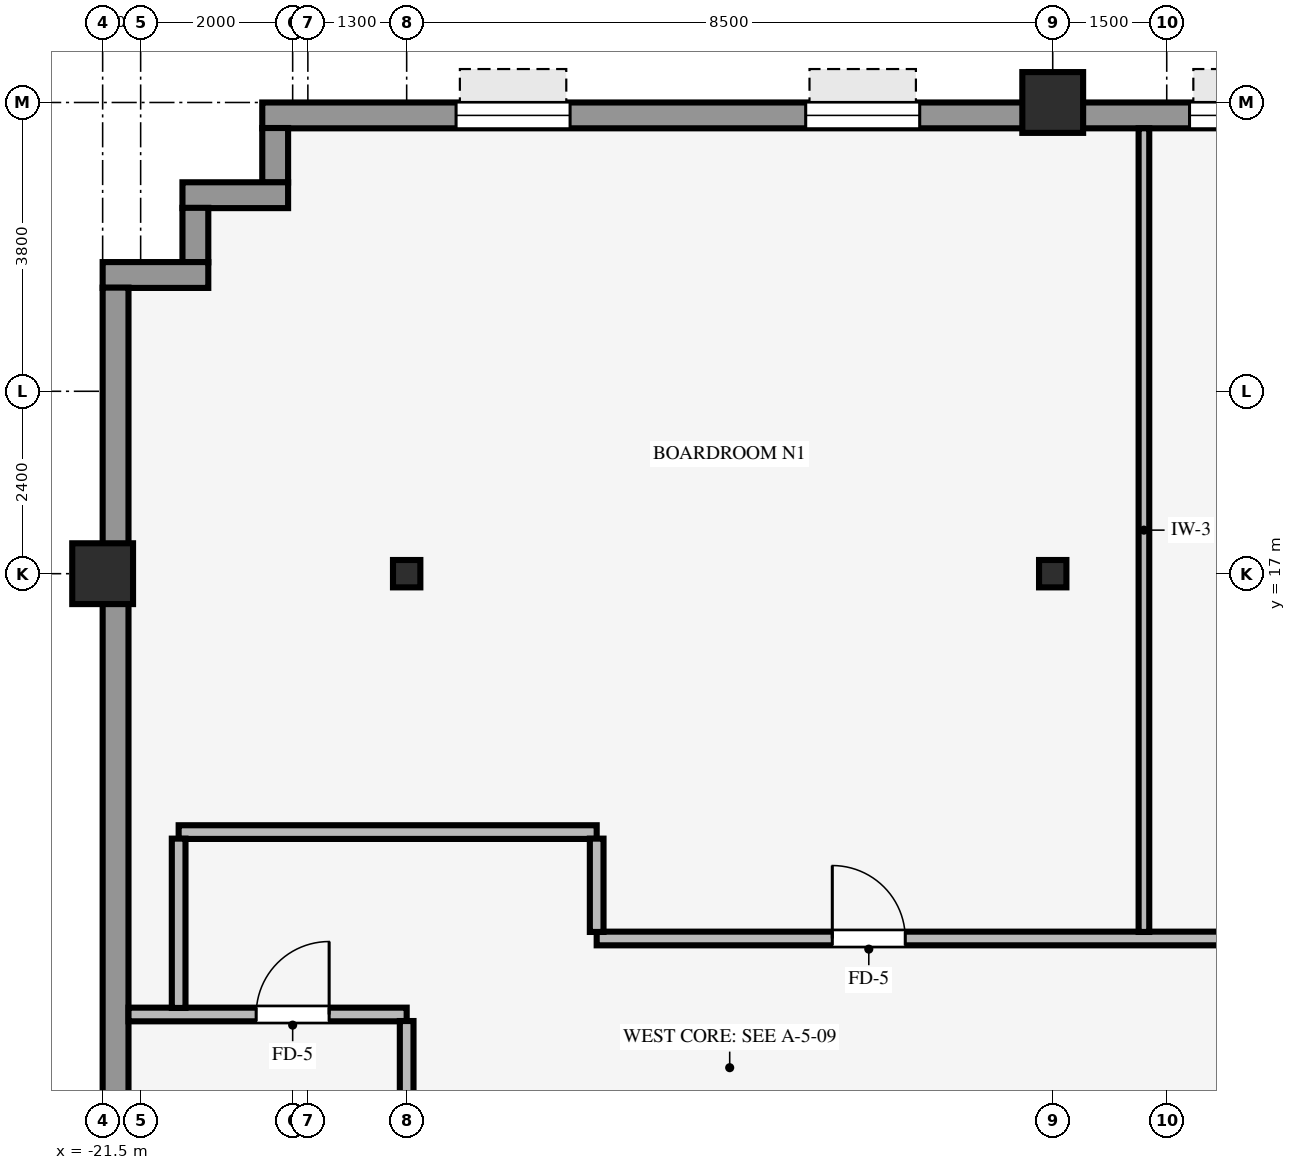
"""IFC4 building model, lengths in metres.
Left out: names, types, materials, properties, quantities, classifications, styles, units other than length and angle.
Written with IfcOpenShell. Run it as: python <this file> out.ifc"""

import sys

from ifc_helpers import new_model, si_unit, direction, frame, frame_2d, origin, origin_2d, place, context, subcontext, project, spatial, rectangle, hollow_rectangle, i_section, extrude, source, transform, mapped, element, fill, save


model = new_model("IFC4")
c1 = context("Model", 3, precision=1e-05, world=origin(), true_north=direction((0.0, 1.0)))
c2 = subcontext(c1, "Body", "Model", "MODEL_VIEW")
j1 = project(units=[si_unit("LENGTHUNIT", "METRE"), si_unit("PLANEANGLEUNIT", "RADIAN")], contexts=[c1])
p1 = place(None, origin())
s1 = spatial("IfcSite", under=j1, at=p1, CompositionType="ELEMENT")
p2 = place(p1, origin())
s2 = spatial("IfcBuilding", under=s1, at=p2, CompositionType="ELEMENT")
p3 = place(p2, frame((0.0, 0.0, 82.35)))
s3 = spatial("IfcBuildingStorey", under=s2, at=p3, CompositionType="ELEMENT", Elevation=82.35)
for number, where, z_axis, x_axis in (
    (1, (-21.5, 17.0, 0.0), (0.0, 0.0, 1.0), (1.0, 0.0, 0.0)),
    (2, (-9.0, 23.2, 0.0), (0.0, 0.0, 1.0), (1.0, 0.0, 0.0)),
):
    element("IfcColumn", number, at=place(p3, frame(where, z_axis=z_axis, x_axis=x_axis)), inside=s3, PredefinedType="COLUMN", context=c2, shape_type="SweptSolid", body=[
        extrude(hollow_rectangle(XDim=0.8, YDim=0.8, WallThickness=0.055, InnerFilletRadius=0.055, OuterFilletRadius=0.11, at=origin_2d()), origin(), (0.0, 0.0, 1.0), 3.25),
    ])
for number, where, z_axis, x_axis in (
    (3, (-17.5, 17.0, 0.0), (0.0, 0.0, 1.0), (1.0, 0.0, 0.0)),
    (4, (-9.0, 17.0, 0.0), (0.0, 0.0, 1.0), (1.0, 0.0, 0.0)),
):
    element("IfcColumn", number, at=place(p3, frame(where, z_axis=z_axis, x_axis=x_axis)), inside=s3, PredefinedType="COLUMN", context=c2, shape_type="SweptSolid", body=[
        extrude(i_section(OverallWidth=0.36, OverallDepth=0.36, WebThickness=0.021, FlangeThickness=0.021, FilletRadius=0.018, at=origin_2d()), origin(), (0.0, 0.0, 1.0), 3.25),
    ])
p4 = place(p3, frame((-19.4, 23.03, 0.0), z_axis=(0.0, 0.0, 1.0), x_axis=(1.0, 0.0, 0.0)))
e5 = element("IfcWall", 5, at=p4, inside=s3, PredefinedType="STANDARD", context=c2, shape_type="SweptSolid", body=[
    extrude(rectangle(XDim=38.8, YDim=0.34, at=frame_2d((19.4, 0.0))), origin(), (0.0, 0.0, 1.0), 2.585),
])
p5 = place(p4, frame((2.55, 0.0, 0.8)))
e6 = element("IfcOpeningElement", 6, at=p5, cuts=e5, PredefinedType="OPENING", context=c2, shape_type="SweptSolid", body=[
    extrude(rectangle(XDim=1.5, YDim=1.6, at=frame_2d((0.75, 0.8))), frame((0.0, 0.18, 0.0), z_axis=(0.0, -1.0, 0.0), x_axis=(1.0, 0.0, 0.0)), (0.0, 0.0, 1.0), 0.36),
])
p6 = place(p4, frame((7.15, 0.0, 0.8)))
e7 = element("IfcOpeningElement", 7, at=p6, cuts=e5, PredefinedType="OPENING", context=c2, shape_type="SweptSolid", body=[
    extrude(rectangle(XDim=1.5, YDim=1.6, at=frame_2d((0.75, 0.8))), frame((0.0, 0.18, 0.0), z_axis=(0.0, -1.0, 0.0), x_axis=(1.0, 0.0, 0.0)), (0.0, 0.0, 1.0), 0.36),
])
p7 = place(p4, frame((12.2, 0.0, 0.8)))
e8 = element("IfcOpeningElement", 8, at=p7, cuts=e5, PredefinedType="OPENING", context=c2, shape_type="SweptSolid", body=[
    extrude(rectangle(XDim=1.5, YDim=1.6, at=frame_2d((0.75, 0.8))), frame((0.0, 0.18, 0.0), z_axis=(0.0, -1.0, 0.0), x_axis=(1.0, 0.0, 0.0)), (0.0, 0.0, 1.0), 0.36),
])
p8 = place(p4, frame((16.35, 0.0, 0.8)))
e9 = element("IfcOpeningElement", 9, at=p8, cuts=e5, PredefinedType="OPENING", context=c2, shape_type="SweptSolid", body=[
    extrude(rectangle(XDim=1.5, YDim=1.6, at=frame_2d((0.75, 0.8))), frame((0.0, 0.18, 0.0), z_axis=(0.0, -1.0, 0.0), x_axis=(1.0, 0.0, 0.0)), (0.0, 0.0, 1.0), 0.36),
])
p9 = place(p4, frame((20.95, 0.0, 0.8)))
e10 = element("IfcOpeningElement", 10, at=p9, cuts=e5, PredefinedType="OPENING", context=c2, shape_type="SweptSolid", body=[
    extrude(rectangle(XDim=1.5, YDim=1.6, at=frame_2d((0.75, 0.8))), frame((0.0, 0.18, 0.0), z_axis=(0.0, -1.0, 0.0), x_axis=(1.0, 0.0, 0.0)), (0.0, 0.0, 1.0), 0.36),
])
p10 = place(p4, frame((25.55, 0.0, 0.8)))
e11 = element("IfcOpeningElement", 11, at=p10, cuts=e5, PredefinedType="OPENING", context=c2, shape_type="SweptSolid", body=[
    extrude(rectangle(XDim=1.5, YDim=1.6, at=frame_2d((0.75, 0.8))), frame((0.0, 0.18, 0.0), z_axis=(0.0, -1.0, 0.0), x_axis=(1.0, 0.0, 0.0)), (0.0, 0.0, 1.0), 0.36),
])
p11 = place(p4, frame((30.15, 0.0, 0.8)))
e12 = element("IfcOpeningElement", 12, at=p11, cuts=e5, PredefinedType="OPENING", context=c2, shape_type="SweptSolid", body=[
    extrude(rectangle(XDim=1.5, YDim=1.6, at=frame_2d((0.75, 0.8))), frame((0.0, 0.18, 0.0), z_axis=(0.0, -1.0, 0.0), x_axis=(1.0, 0.0, 0.0)), (0.0, 0.0, 1.0), 0.36),
])
p12 = place(p4, frame((34.75, 0.0, 0.8)))
e13 = element("IfcOpeningElement", 13, at=p12, cuts=e5, PredefinedType="OPENING", context=c2, shape_type="SweptSolid", body=[
    extrude(rectangle(XDim=1.5, YDim=1.6, at=frame_2d((0.75, 0.8))), frame((0.0, 0.18, 0.0), z_axis=(0.0, -1.0, 0.0), x_axis=(1.0, 0.0, 0.0)), (0.0, 0.0, 1.0), 0.36),
])
p13 = place(p3, frame((-19.23, 22.146, 0.0), z_axis=(0.0, 0.0, 1.0), x_axis=(0.0, 1.0, 0.0)))
e14 = element("IfcWall", 14, at=p13, inside=s3, PredefinedType="STANDARD", context=c2, shape_type="SweptSolid", body=[
    extrude(rectangle(XDim=0.718, YDim=0.34, at=frame_2d((0.359, 0.0))), origin(), (0.0, 0.0, 1.0), 3.24),
])
p14 = place(p3, frame((-20.45, 21.98, 0.0), z_axis=(0.0, 0.0, 1.0), x_axis=(1.0, 0.0, 0.0)))
e15 = element("IfcWall", 15, at=p14, inside=s3, PredefinedType="STANDARD", context=c2, shape_type="SweptSolid", body=[
    extrude(rectangle(XDim=1.39, YDim=0.34, at=frame_2d((0.695, 0.0))), origin(), (0.0, 0.0, 1.0), 3.24),
])
p15 = place(p3, frame((-20.28, 21.096, 0.0), z_axis=(0.0, 0.0, 1.0), x_axis=(0.0, 1.0, 0.0)))
e16 = element("IfcWall", 16, at=p15, inside=s3, PredefinedType="STANDARD", context=c2, shape_type="SweptSolid", body=[
    extrude(rectangle(XDim=0.718, YDim=0.34, at=frame_2d((0.359, 0.0))), origin(), (0.0, 0.0, 1.0), 3.24),
])
p16 = place(p3, frame((-21.5, 20.93, 0.0), z_axis=(0.0, 0.0, 1.0), x_axis=(1.0, 0.0, 0.0)))
e17 = element("IfcWall", 17, at=p16, inside=s3, PredefinedType="STANDARD", context=c2, shape_type="SweptSolid", body=[
    extrude(rectangle(XDim=1.39, YDim=0.34, at=frame_2d((0.695, 0.0))), origin(), (0.0, 0.0, 1.0), 3.24),
])
p17 = place(p3, frame((-21.33, -20.764, 0.0), z_axis=(0.0, 0.0, 1.0), x_axis=(0.0, 1.0, 0.0)))
e18 = element("IfcWall", 18, at=p17, inside=s3, PredefinedType="STANDARD", context=c2, shape_type="SweptSolid", body=[
    extrude(rectangle(XDim=41.528, YDim=0.34, at=frame_2d((20.764, 0.0))), origin(), (0.0, 0.0, 1.0), 3.24),
])
p18 = place(p17, frame((15.364, 0.0, 0.0)))
e19 = element("IfcOpeningElement", 19, at=p18, cuts=e18, PredefinedType="OPENING", context=c2, shape_type="SweptSolid", body=[
    extrude(rectangle(XDim=1.05, YDim=2.1, at=frame_2d((0.525, 1.05))), frame((0.0, 0.18, 0.0), z_axis=(0.0, -1.0, 0.0), x_axis=(1.0, 0.0, 0.0)), (0.0, 0.0, 1.0), 0.36),
])
p19 = place(p17, frame((17.144, 0.0, 0.8)))
e20 = element("IfcOpeningElement", 20, at=p19, cuts=e18, PredefinedType="OPENING", context=c2, shape_type="SweptSolid", body=[
    extrude(rectangle(XDim=2.3, YDim=1.62, at=frame_2d((1.15, 0.81))), frame((0.0, 0.18, 0.0), z_axis=(0.0, -1.0, 0.0), x_axis=(1.0, 0.0, 0.0)), (0.0, 0.0, 1.0), 0.36),
])
p20 = place(p17, frame((22.084, 0.0, 0.8)))
e21 = element("IfcOpeningElement", 21, at=p20, cuts=e18, PredefinedType="OPENING", context=c2, shape_type="SweptSolid", body=[
    extrude(rectangle(XDim=2.3, YDim=1.62, at=frame_2d((1.15, 0.81))), frame((0.0, 0.18, 0.0), z_axis=(0.0, -1.0, 0.0), x_axis=(1.0, 0.0, 0.0)), (0.0, 0.0, 1.0), 0.36),
])
p21 = place(p3, frame((-21.16, 11.2, 0.0), z_axis=(0.0, 0.0, 1.0), x_axis=(1.0, 0.0, 0.0)))
e22 = element("IfcWall", 22, at=p21, inside=s3, PredefinedType="PARTITIONING", context=c2, shape_type="SweptSolid", body=[
    extrude(rectangle(XDim=3.66, YDim=0.18, at=frame_2d((1.83, 0.0))), origin(), (0.0, 0.0, 1.0), 3.24),
])
p22 = place(p21, frame((1.68, 0.0, 0.0)))
e23 = element("IfcOpeningElement", 23, at=p22, cuts=e22, PredefinedType="OPENING", context=c2, shape_type="SweptSolid", body=[
    extrude(rectangle(XDim=0.96, YDim=2.1, at=frame_2d((0.48, 1.05))), frame((0.0, 0.1, 0.0), z_axis=(0.0, -1.0, 0.0), x_axis=(1.0, 0.0, 0.0)), (0.0, 0.0, 1.0), 0.2),
])
p23 = place(p3, frame((-15.0, 12.2, 0.0), z_axis=(0.0, 0.0, 1.0), x_axis=(1.0, 0.0, 0.0)))
e24 = element("IfcWall", 24, at=p23, inside=s3, PredefinedType="PARTITIONING", context=c2, shape_type="SweptSolid", body=[
    extrude(rectangle(XDim=30.0, YDim=0.18, at=frame_2d((15.0, 0.0))), origin(), (0.0, 0.0, 1.0), 3.24),
])
p24 = place(p23, frame((3.1, 0.0, 0.0)))
e25 = element("IfcOpeningElement", 25, at=p24, cuts=e24, PredefinedType="OPENING", context=c2, shape_type="SweptSolid", body=[
    extrude(rectangle(XDim=0.96, YDim=2.1, at=frame_2d((0.48, 1.05))), frame((0.0, 0.1, 0.0), z_axis=(0.0, -1.0, 0.0), x_axis=(1.0, 0.0, 0.0)), (0.0, 0.0, 1.0), 0.2),
])
p25 = place(p23, frame((16.395, 0.0, 0.0)))
e26 = element("IfcOpeningElement", 26, at=p25, cuts=e24, PredefinedType="OPENING", context=c2, shape_type="SweptSolid", body=[
    extrude(rectangle(XDim=0.96, YDim=2.1, at=frame_2d((0.48, 1.05))), frame((0.0, 0.1, 0.0), z_axis=(0.0, -1.0, 0.0), x_axis=(1.0, 0.0, 0.0)), (0.0, 0.0, 1.0), 0.2),
])
p26 = place(p23, frame((21.62, 0.0, 0.0)))
e27 = element("IfcOpeningElement", 27, at=p26, cuts=e24, PredefinedType="OPENING", context=c2, shape_type="SweptSolid", body=[
    extrude(rectangle(XDim=0.96, YDim=2.1, at=frame_2d((0.48, 1.05))), frame((0.0, 0.1, 0.0), z_axis=(0.0, -1.0, 0.0), x_axis=(1.0, 0.0, 0.0)), (0.0, 0.0, 1.0), 0.2),
])
p27 = place(p23, frame((9.0, 0.0, 0.0)))
e28 = element("IfcOpeningElement", 28, at=p27, cuts=e24, PredefinedType="OPENING", context=c2, shape_type="SweptSolid", body=[
    extrude(rectangle(XDim=0.96, YDim=2.1, at=frame_2d((0.48, 1.05))), frame((0.0, 0.1, 0.0), z_axis=(0.0, -1.0, 0.0), x_axis=(1.0, 0.0, 0.0)), (0.0, 0.0, 1.0), 0.2),
])
p28 = place(p23, frame((26.08, 0.0, 0.0)))
e29 = element("IfcOpeningElement", 29, at=p28, cuts=e24, PredefinedType="OPENING", context=c2, shape_type="SweptSolid", body=[
    extrude(rectangle(XDim=0.96, YDim=2.1, at=frame_2d((0.48, 1.05))), frame((0.0, 0.1, 0.0), z_axis=(0.0, -1.0, 0.0), x_axis=(1.0, 0.0, 0.0)), (0.0, 0.0, 1.0), 0.2),
])
p29 = place(p3, frame((-20.5, 13.6, 0.0), z_axis=(0.0, 0.0, 1.0), x_axis=(1.0, 0.0, 0.0)))
e30 = element("IfcWall", 30, at=p29, inside=s3, PredefinedType="PARTITIONING", context=c2, shape_type="SweptSolid", body=[
    extrude(rectangle(XDim=5.5, YDim=0.18, at=frame_2d((2.75, 0.0))), origin(), (0.0, 0.0, 1.0), 2.878),
])
p30 = place(p3, frame((-20.5, 11.286, 0.0), z_axis=(0.0, 0.0, 1.0), x_axis=(0.0, 1.0, 0.0)))
e31 = element("IfcWall", 31, at=p30, inside=s3, PredefinedType="PARTITIONING", context=c2, shape_type="SweptSolid", body=[
    extrude(rectangle(XDim=2.228, YDim=0.18, at=frame_2d((1.114, 0.0))), origin(), (0.0, 0.0, 1.0), 3.24),
])
p31 = place(p3, frame((-17.5, 10.146, 0.0), z_axis=(0.0, 0.0, 1.0), x_axis=(0.0, 1.0, 0.0)))
e32 = element("IfcWall", 32, at=p31, inside=s3, PredefinedType="PARTITIONING", context=c2, shape_type="SweptSolid", body=[
    extrude(rectangle(XDim=0.968, YDim=0.18, at=frame_2d((0.484, 0.0))), origin(), (0.0, 0.0, 1.0), 2.618),
])
p32 = place(p3, frame((-15.0, 12.286, 0.0), z_axis=(0.0, 0.0, 1.0), x_axis=(0.0, 1.0, 0.0)))
e33 = element("IfcWall", 33, at=p32, inside=s3, PredefinedType="PARTITIONING", context=c2, shape_type="SweptSolid", body=[
    extrude(rectangle(XDim=1.228, YDim=0.18, at=frame_2d((0.614, 0.0))), origin(), (0.0, 0.0, 1.0), 3.24),
])
p33 = place(p3, frame((-7.8, 12.286, 0.0), z_axis=(0.0, 0.0, 1.0), x_axis=(0.0, 1.0, 0.0)))
e34 = element("IfcWall", 34, at=p33, inside=s3, PredefinedType="PARTITIONING", context=c2, shape_type="SweptSolid", body=[
    extrude(rectangle(XDim=10.574, YDim=0.14, at=frame_2d((5.287, 0.0))), origin(), (0.0, 0.0, 1.0), 3.24),
])
m1 = source(origin(), c2, "Body", "SweptSolid", [
    extrude(rectangle(XDim=1.5, YDim=1.6, at=frame_2d((0.75, 0.8))), frame((0.0, 0.03, 0.0), z_axis=(0.0, -1.0, 0.0), x_axis=(1.0, 0.0, 0.0)), (0.0, 0.0, 1.0), 0.06),
])
p34 = place(p5, origin())
e35 = element("IfcWindow", 35, at=p34, inside=s3, PartitioningType="SINGLE_PANEL", PredefinedType="WINDOW", context=c2, shape_type="MappedRepresentation", body=[
    mapped(m1, transform((0.0, 0.0, 0.0), scale=1.0)),
])
fill(e6, e35)
p35 = place(p6, origin())
e36 = element("IfcWindow", 36, at=p35, inside=s3, PartitioningType="SINGLE_PANEL", PredefinedType="WINDOW", context=c2, shape_type="MappedRepresentation", body=[
    mapped(m1, transform((0.0, 0.0, 0.0), scale=1.0)),
])
fill(e7, e36)
p36 = place(p7, origin())
e37 = element("IfcWindow", 37, at=p36, inside=s3, PartitioningType="SINGLE_PANEL", PredefinedType="WINDOW", context=c2, shape_type="MappedRepresentation", body=[
    mapped(m1, transform((0.0, 0.0, 0.0), scale=1.0)),
])
fill(e8, e37)
m2 = source(origin(), c2, "Body", "SweptSolid", [
    extrude(rectangle(XDim=0.96, YDim=2.1, at=frame_2d((0.48, 1.05))), frame((0.0, 0.025, 0.0), z_axis=(0.0, -1.0, 0.0), x_axis=(1.0, 0.0, 0.0)), (0.0, 0.0, 1.0), 0.05),
])
p37 = place(p24, origin())
e38 = element("IfcDoor", 38, at=p37, inside=s3, OperationType="SINGLE_SWING_LEFT", PredefinedType="DOOR", context=c2, shape_type="MappedRepresentation", body=[
    mapped(m2, transform((0.0, 0.0, 0.0), scale=1.0)),
])
fill(e25, e38)
p38 = place(p22, origin())
e39 = element("IfcDoor", 39, at=p38, inside=s3, OperationType="SINGLE_SWING_RIGHT", PredefinedType="DOOR", context=c2, shape_type="MappedRepresentation", body=[
    mapped(m2, transform((0.0, 0.0, 0.0), scale=1.0)),
])
fill(e23, e39)
save(model, sys.argv[1])
